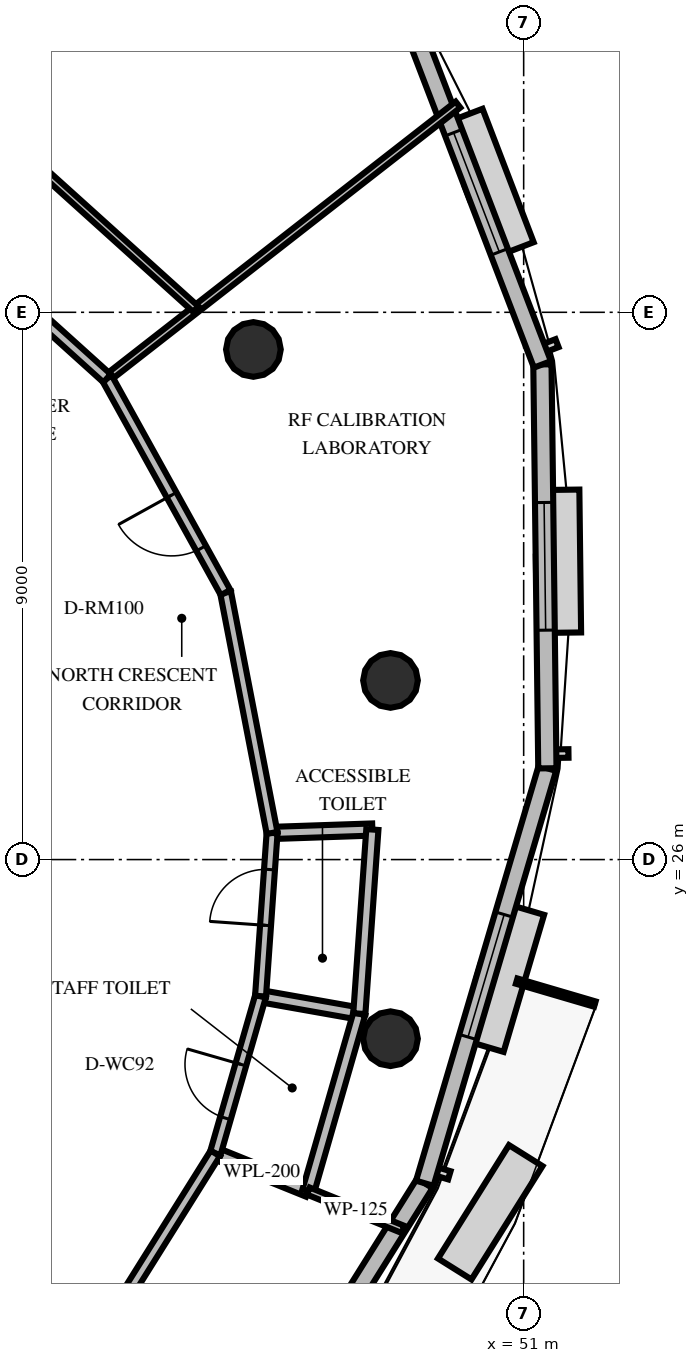
"""IFC4 building model, lengths in metres.
Left out: names, types, materials, properties, quantities, classifications, styles, units other than length and angle.
Written with IfcOpenShell. Run it as: python <this file> out.ifc"""

import sys

from ifc_helpers import new_model, si_unit, direction, frame, frame_2d, origin, origin_2d, place, context, subcontext, project, spatial, rectangle, circle, extrude, element, fill, save


model = new_model("IFC4")
c1 = context("Model", 3, precision=1e-05, world=origin(), true_north=direction((0.0, 1.0)))
c2 = subcontext(c1, "Body", "Model", "MODEL_VIEW")
j1 = project(units=[si_unit("LENGTHUNIT", "METRE"), si_unit("PLANEANGLEUNIT", "RADIAN")], contexts=[c1])
p1 = place(None, origin())
s1 = spatial("IfcSite", under=j1, at=p1, CompositionType="ELEMENT")
p2 = place(p1, origin())
s2 = spatial("IfcBuilding", under=s1, at=p2, CompositionType="ELEMENT")
p3 = place(p2, frame((0.0, 0.0, 270.0)))
s3 = spatial("IfcBuildingStorey", under=s2, at=p3, CompositionType="ELEMENT", Elevation=270.0)
for number, where, z_axis, x_axis in (
    (1, (48.81, 28.946, 0.0), (0.0, 0.0, 1.0), (1.0, 0.0, 0.0)),
    (2, (46.555, 34.389, 0.0), (0.0, 0.0, 1.0), (1.0, 0.0, 0.0)),
    (3, (48.81, 23.054, 0.0), (0.0, 0.0, 1.0), (1.0, 0.0, 0.0)),
):
    element("IfcColumn", number, at=place(p3, frame(where, z_axis=z_axis, x_axis=x_axis)), inside=s3, PredefinedType="COLUMN", context=c2, shape_type="SweptSolid", body=[
        extrude(circle(Radius=0.45, at=origin_2d()), origin(), (0.0, 0.0, 1.0), 3.6),
    ])
p4 = place(p3, frame((45.504, 14.495, 0.0), z_axis=(0.0, 0.0, 1.0), x_axis=(0.530648729616, 0.847591839129, 0.0)))
e4 = element("IfcWall", 4, at=p4, inside=s3, PredefinedType="SOLIDWALL", context=c2, shape_type="SweptSolid", body=[
    extrude(rectangle(XDim=7.293, YDim=0.3, at=frame_2d((3.646, 0.0))), origin(), (0.0, 0.0, 1.0), 2.76),
])
p5 = place(p4, frame((0.35, 0.0, 0.0)))
e5 = element("IfcOpeningElement", 5, at=p5, cuts=e4, PredefinedType="OPENING", context=c2, shape_type="SweptSolid", body=[
    extrude(rectangle(XDim=1.05, YDim=2.15, at=frame_2d((0.525, 1.075))), frame((0.0, 0.16, 0.0), z_axis=(0.0, -1.0, 0.0), x_axis=(1.0, 0.0, 0.0)), (0.0, 0.0, 1.0), 0.32),
])
p6 = place(p3, frame((49.374, 20.677, 0.0), z_axis=(0.0, 0.0, 1.0), x_axis=(0.283347575433, 0.959017284253, 0.0)))
e6 = element("IfcWall", 6, at=p6, inside=s3, PredefinedType="SOLIDWALL", context=c2, shape_type="SweptSolid", body=[
    extrude(rectangle(XDim=7.115, YDim=0.3, at=frame_2d((3.558, 0.0))), origin(), (0.0, 0.0, 1.0), 2.76),
])
p7 = place(p6, frame((2.508, 0.0, 0.8)))
e7 = element("IfcOpeningElement", 7, at=p7, cuts=e6, PredefinedType="OPENING", context=c2, shape_type="SweptSolid", body=[
    extrude(rectangle(XDim=2.1, YDim=1.85, at=frame_2d((1.05, 0.925))), frame((0.0, 0.16, 0.0), z_axis=(0.0, -1.0, 0.0), x_axis=(1.0, 0.0, 0.0)), (0.0, 0.0, 1.0), 0.32),
])
p8 = place(p3, frame((51.39, 27.501, 0.0), z_axis=(0.0, 0.0, 1.0), x_axis=(-0.012311621951, 0.99992420911, 0.0)))
e8 = element("IfcWall", 8, at=p8, inside=s3, PredefinedType="SOLIDWALL", context=c2, shape_type="SweptSolid", body=[
    extrude(rectangle(XDim=6.643, YDim=0.3, at=frame_2d((3.322, 0.0))), origin(), (0.0, 0.0, 1.0), 2.76),
])
p9 = place(p8, frame((2.272, 0.0, 0.8)))
e9 = element("IfcOpeningElement", 9, at=p9, cuts=e8, PredefinedType="OPENING", context=c2, shape_type="SweptSolid", body=[
    extrude(rectangle(XDim=2.1, YDim=1.85, at=frame_2d((1.05, 0.925))), frame((0.0, 0.16, 0.0), z_axis=(0.0, -1.0, 0.0), x_axis=(1.0, 0.0, 0.0)), (0.0, 0.0, 1.0), 0.32),
])
p10 = place(p3, frame((51.308, 34.143, 0.0), z_axis=(0.0, 0.0, 1.0), x_axis=(-0.357845295603, 0.933780886726, 0.0)))
e10 = element("IfcWall", 10, at=p10, inside=s3, PredefinedType="SOLIDWALL", context=c2, shape_type="SweptSolid", body=[
    extrude(rectangle(XDim=6.062, YDim=0.3, at=frame_2d((3.031, 0.0))), origin(), (0.0, 0.0, 1.0), 2.76),
])
p11 = place(p10, frame((1.981, 0.0, 0.8)))
e11 = element("IfcOpeningElement", 11, at=p11, cuts=e10, PredefinedType="OPENING", context=c2, shape_type="SweptSolid", body=[
    extrude(rectangle(XDim=2.1, YDim=1.85, at=frame_2d((1.05, 0.925))), frame((0.0, 0.16, 0.0), z_axis=(0.0, -1.0, 0.0), x_axis=(1.0, 0.0, 0.0)), (0.0, 0.0, 1.0), 0.32),
])
for number, where, z_axis, x_axis in (
    (12, (45.929, 21.168, 0.0), (0.0, 0.0, 1.0), (0.927, -0.375, 0.0)),
    (13, (46.673, 23.754, 0.0), (0.0, 0.0, 1.0), (0.985, -0.174, 0.0)),
):
    element("IfcWall", number, at=place(p3, frame(where, z_axis=z_axis, x_axis=x_axis)), inside=s3, PredefinedType="PLUMBINGWALL", context=c2, shape_type="SweptSolid", body=[
        extrude(rectangle(XDim=1.65, YDim=0.2, at=frame_2d((0.825, 0.0))), origin(), (0.0, 0.0, 1.0), 2.46),
    ])
p12 = place(p3, frame((47.458, 20.549, 0.0), z_axis=(0.0, 0.0, 1.0), x_axis=(0.276430925785, 0.961033788828, 0.0)))
e14 = element("IfcWall", 14, at=p12, inside=s3, PredefinedType="PLUMBINGWALL", context=c2, shape_type="SweptSolid", body=[
    extrude(rectangle(XDim=3.035, YDim=0.2, at=frame_2d((1.518, 0.0))), origin(), (0.0, 0.0, 1.0), 2.46),
])
p13 = place(p3, frame((45.929, 21.168, 0.0), z_axis=(0.0, 0.0, 1.0), x_axis=(0.27648237713, 0.961018987917, 0.0)))
e15 = element("IfcWall", 15, at=p13, inside=s3, PredefinedType="PARTITIONING", context=c2, shape_type="SweptSolid", body=[
    extrude(rectangle(XDim=2.691, YDim=0.18, at=frame_2d((1.345, 0.0))), origin(), (0.0, 0.0, 1.0), 2.46),
])
p14 = place(p13, frame((0.603, 0.0, 0.0)))
e16 = element("IfcOpeningElement", 16, at=p14, cuts=e15, PredefinedType="OPENING", context=c2, shape_type="SweptSolid", body=[
    extrude(rectangle(XDim=0.92, YDim=2.1, at=frame_2d((0.46, 1.05))), frame((0.0, 0.1, 0.0), z_axis=(0.0, -1.0, 0.0), x_axis=(1.0, 0.0, 0.0)), (0.0, 0.0, 1.0), 0.2),
])
p15 = place(p3, frame((46.863, 26.438, 0.0), z_axis=(0.0, 0.0, 1.0), x_axis=(0.999420841341, 0.034029133014, 0.0)))
e17 = element("IfcWall", 17, at=p15, inside=s3, PredefinedType="PLUMBINGWALL", context=c2, shape_type="SweptSolid", body=[
    extrude(rectangle(XDim=1.65, YDim=0.2, at=frame_2d((0.825, 0.0))), origin(), (0.0, 0.0, 1.0), 2.46),
])
p16 = place(p3, frame((48.297, 23.466, 0.0), z_axis=(0.0, 0.0, 1.0), x_axis=(0.070698316115, 0.997497743405, 0.0)))
e18 = element("IfcWall", 18, at=p16, inside=s3, PredefinedType="PLUMBINGWALL", context=c2, shape_type="SweptSolid", body=[
    extrude(rectangle(XDim=3.035, YDim=0.2, at=frame_2d((1.518, 0.0))), origin(), (0.0, 0.0, 1.0), 2.46),
])
p17 = place(p3, frame((46.673, 23.754, 0.0), z_axis=(0.0, 0.0, 1.0), x_axis=(0.070595733357, 0.997505008725, 0.0)))
e19 = element("IfcWall", 19, at=p17, inside=s3, PredefinedType="PARTITIONING", context=c2, shape_type="SweptSolid", body=[
    extrude(rectangle(XDim=2.69, YDim=0.18, at=frame_2d((1.345, 0.0))), origin(), (0.0, 0.0, 1.0), 2.46),
])
p18 = place(p17, frame((1.167, 0.0, 0.0)))
e20 = element("IfcOpeningElement", 20, at=p18, cuts=e19, PredefinedType="OPENING", context=c2, shape_type="SweptSolid", body=[
    extrude(rectangle(XDim=0.92, YDim=2.1, at=frame_2d((0.46, 1.05))), frame((0.0, 0.1, 0.0), z_axis=(0.0, -1.0, 0.0), x_axis=(1.0, 0.0, 0.0)), (0.0, 0.0, 1.0), 0.2),
])
p19 = place(p3, frame((47.458, 20.549, 0.0), z_axis=(0.0, 0.0, 1.0), x_axis=(0.926855389393, -0.375418549292, 0.0)))
e21 = element("IfcWall", 21, at=p19, inside=s3, PredefinedType="PARTITIONING", context=c2, shape_type="SweptSolid", body=[
    extrude(rectangle(XDim=1.681, YDim=0.125, at=frame_2d((0.841, 0.0))), origin(), (0.0, 0.0, 1.0), 2.46),
])
p20 = place(p3, frame((44.149, 33.915, 0.0), z_axis=(0.0, 0.0, 1.0), x_axis=(0.788548574124, 0.614972476008, 0.0)))
e22 = element("IfcWall", 22, at=p20, inside=s3, PredefinedType="PARTITIONING", context=c2, shape_type="SweptSolid", body=[
    extrude(rectangle(XDim=7.318, YDim=0.125, at=frame_2d((3.659, 0.0))), origin(), (0.0, 0.0, 1.0), 2.46),
])
p21 = place(p3, frame((46.863, 26.438, 0.0), z_axis=(0.0, 0.0, 1.0), x_axis=(-0.189967232021, 0.981790431181, 0.0)))
e23 = element("IfcWall", 23, at=p21, inside=s3, PredefinedType="PARTITIONING", context=c2, shape_type="SweptSolid", body=[
    extrude(rectangle(XDim=4.026, YDim=0.18, at=frame_2d((2.013, 0.0))), origin(), (0.0, 0.0, 1.0), 2.46),
])
p22 = place(p3, frame((46.098, 30.391, 0.0), z_axis=(0.0, 0.0, 1.0), x_axis=(-0.484005083868, 0.875065185452, 0.0)))
e24 = element("IfcWall", 24, at=p22, inside=s3, PredefinedType="PARTITIONING", context=c2, shape_type="SweptSolid", body=[
    extrude(rectangle(XDim=4.027, YDim=0.18, at=frame_2d((2.013, 0.0))), origin(), (0.0, 0.0, 1.0), 2.46),
])
p23 = place(p22, frame((0.832, 0.0, 0.0)))
e25 = element("IfcOpeningElement", 25, at=p23, cuts=e24, PredefinedType="OPENING", context=c2, shape_type="SweptSolid", body=[
    extrude(rectangle(XDim=1.0, YDim=2.15, at=frame_2d((0.5, 1.075))), frame((0.0, 0.1, 0.0), z_axis=(0.0, -1.0, 0.0), x_axis=(1.0, 0.0, 0.0)), (0.0, 0.0, 1.0), 0.2),
])
p24 = place(p3, frame((44.149, 33.915, 0.0), z_axis=(0.0, 0.0, 1.0), x_axis=(-0.742573984857, 0.669764045775, 0.0)))
e26 = element("IfcWall", 26, at=p24, inside=s3, PredefinedType="PARTITIONING", context=c2, shape_type="SweptSolid", body=[
    extrude(rectangle(XDim=4.47, YDim=0.18, at=frame_2d((2.235, 0.0))), origin(), (0.0, 0.0, 1.0), 2.46),
])
p25 = place(p3, frame((45.607, 35.052, 0.0), z_axis=(0.0, 0.0, 1.0), x_axis=(-0.742559943457, 0.669779613286, 0.0)))
e27 = element("IfcWall", 27, at=p25, inside=s3, PredefinedType="PARTITIONING", context=c2, shape_type="SweptSolid", body=[
    extrude(rectangle(XDim=5.112, YDim=0.125, at=frame_2d((2.556, 0.0))), origin(), (0.0, 0.0, 1.0), 2.46),
])
p26 = place(p3, frame((43.557, 17.38, 0.0), z_axis=(0.0, 0.0, 1.0), x_axis=(0.53063705057, 0.847599150874, 0.0)))
e28 = element("IfcWall", 28, at=p26, inside=s3, PredefinedType="PARTITIONING", context=c2, shape_type="SweptSolid", body=[
    extrude(rectangle(XDim=4.47, YDim=0.18, at=frame_2d((2.235, 0.0))), origin(), (0.0, 0.0, 1.0), 2.46),
])
p27 = place(p7, origin())
e29 = element("IfcWindow", 29, at=p27, inside=s3, PartitioningType="SINGLE_PANEL", PredefinedType="WINDOW", context=c2, shape_type="SweptSolid", body=[
    extrude(rectangle(XDim=2.1, YDim=1.85, at=frame_2d((1.05, 0.925))), frame((0.0, 0.03, 0.0), z_axis=(0.0, -1.0, 0.0), x_axis=(1.0, 0.0, 0.0)), (0.0, 0.0, 1.0), 0.06),
])
fill(e7, e29)
p28 = place(p9, origin())
e30 = element("IfcWindow", 30, at=p28, inside=s3, PartitioningType="SINGLE_PANEL", PredefinedType="WINDOW", context=c2, shape_type="SweptSolid", body=[
    extrude(rectangle(XDim=2.1, YDim=1.85, at=frame_2d((1.05, 0.925))), frame((0.0, 0.03, 0.0), z_axis=(0.0, -1.0, 0.0), x_axis=(1.0, 0.0, 0.0)), (0.0, 0.0, 1.0), 0.06),
])
fill(e9, e30)
p29 = place(p11, origin())
e31 = element("IfcWindow", 31, at=p29, inside=s3, PartitioningType="SINGLE_PANEL", PredefinedType="WINDOW", context=c2, shape_type="SweptSolid", body=[
    extrude(rectangle(XDim=2.1, YDim=1.85, at=frame_2d((1.05, 0.925))), frame((0.0, 0.03, 0.0), z_axis=(0.0, -1.0, 0.0), x_axis=(1.0, 0.0, 0.0)), (0.0, 0.0, 1.0), 0.06),
])
fill(e11, e31)
p30 = place(p14, origin())
e32 = element("IfcDoor", 32, at=p30, inside=s3, OperationType="SINGLE_SWING_RIGHT", PredefinedType="DOOR", context=c2, shape_type="SweptSolid", body=[
    extrude(rectangle(XDim=0.92, YDim=2.1, at=frame_2d((0.46, 1.05))), frame((0.0, 0.025, 0.0), z_axis=(0.0, -1.0, 0.0), x_axis=(1.0, 0.0, 0.0)), (0.0, 0.0, 1.0), 0.05),
])
fill(e16, e32)
p31 = place(p18, origin())
e33 = element("IfcDoor", 33, at=p31, inside=s3, OperationType="SINGLE_SWING_LEFT", PredefinedType="DOOR", context=c2, shape_type="SweptSolid", body=[
    extrude(rectangle(XDim=0.92, YDim=2.1, at=frame_2d((0.46, 1.05))), frame((0.0, 0.025, 0.0), z_axis=(0.0, -1.0, 0.0), x_axis=(1.0, 0.0, 0.0)), (0.0, 0.0, 1.0), 0.05),
])
fill(e20, e33)
p32 = place(p23, origin())
e34 = element("IfcDoor", 34, at=p32, inside=s3, OperationType="SINGLE_SWING_RIGHT", PredefinedType="DOOR", context=c2, shape_type="SweptSolid", body=[
    extrude(rectangle(XDim=1.0, YDim=2.15, at=frame_2d((0.5, 1.075))), frame((0.0, 0.025, 0.0), z_axis=(0.0, -1.0, 0.0), x_axis=(1.0, 0.0, 0.0)), (0.0, 0.0, 1.0), 0.05),
])
fill(e25, e34)
save(model, sys.argv[1])
